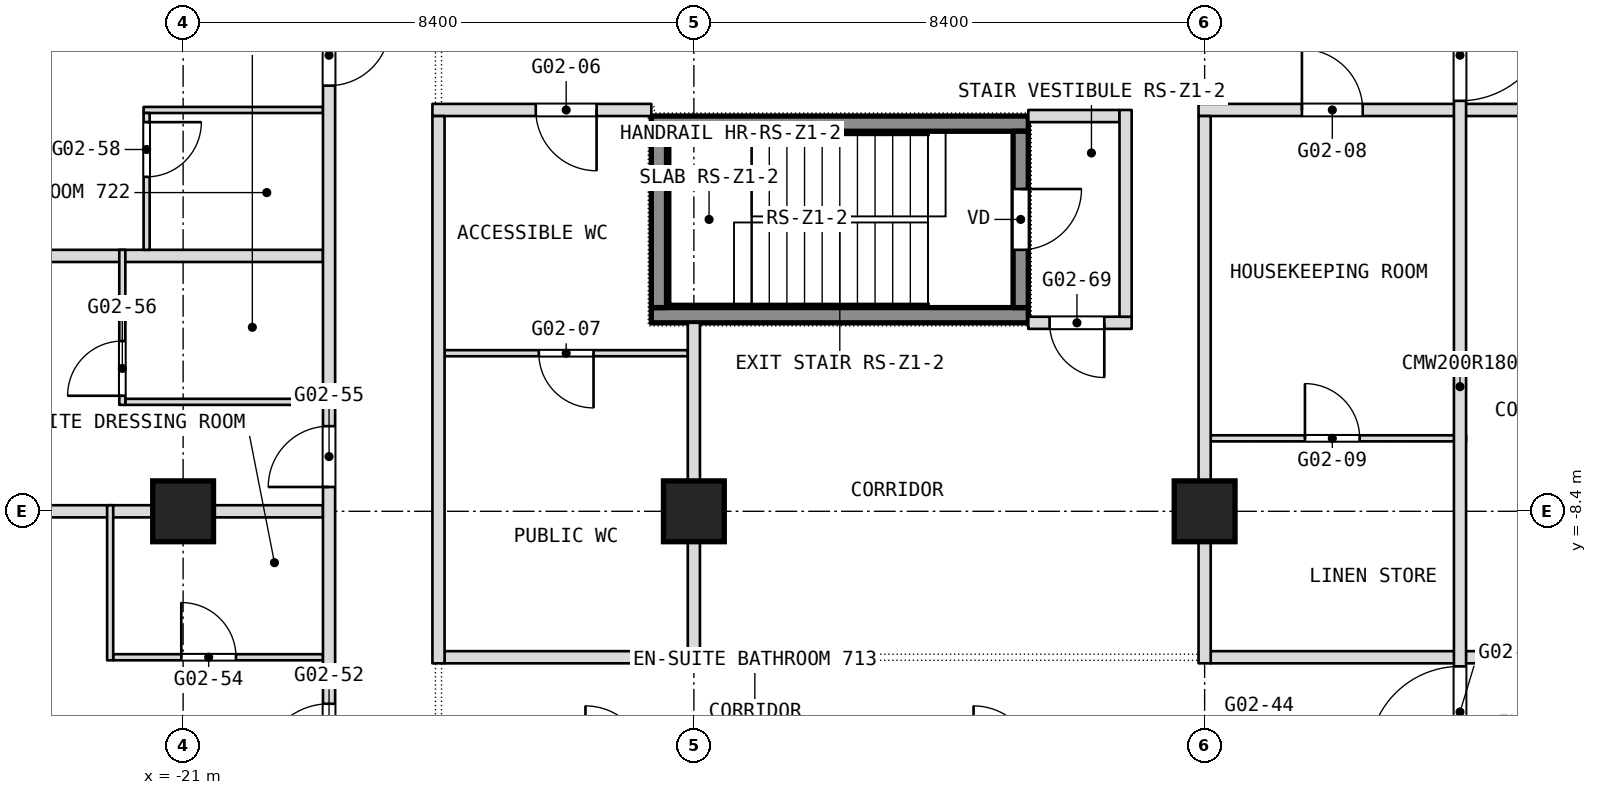
"""IFC4 building model, lengths in metres.
Left out: names, types, materials, properties, quantities, classifications, styles, units other than length and angle.
Written with IfcOpenShell. Run it as: python <this file> out.ifc"""

import sys

from ifc_helpers import new_model, si_unit, direction, frame, frame_2d, origin, origin_2d, place, context, subcontext, project, spatial, rectangle, extrude, element, fill, save


model = new_model("IFC4")
c1 = context("Model", 3, precision=1e-05, world=origin(), true_north=direction((0.0, 1.0)))
c2 = subcontext(c1, "Body", "Model", "MODEL_VIEW")
j1 = project(units=[si_unit("LENGTHUNIT", "METRE"), si_unit("PLANEANGLEUNIT", "RADIAN")], contexts=[c1])
p1 = place(None, origin())
s1 = spatial("IfcSite", under=j1, at=p1, CompositionType="ELEMENT")
p2 = place(p1, origin())
s2 = spatial("IfcBuilding", under=s1, at=p2, CompositionType="ELEMENT")
p3 = place(p2, frame((0.0, 0.0, 40.1)))
s3 = spatial("IfcBuildingStorey", under=s2, at=p3, CompositionType="ELEMENT", Elevation=40.1)
for number, where, z_axis, x_axis in (
    (1, (-21.0, -8.4, 0.0), (0.0, 0.0, 1.0), (1.0, 0.0, 0.0)),
    (2, (-12.6, -8.4, 0.0), (0.0, 0.0, 1.0), (1.0, 0.0, 0.0)),
    (3, (-4.2, -8.4, 0.0), (0.0, 0.0, 1.0), (1.0, 0.0, 0.0)),
):
    element("IfcColumn", number, at=place(p3, frame(where, z_axis=z_axis, x_axis=x_axis)), inside=s3, PredefinedType="COLUMN", context=c2, shape_type="SweptSolid", body=[
        extrude(rectangle(XDim=1.0, YDim=1.0, at=origin_2d()), origin(), (0.0, 0.0, 1.0), 3.6),
    ])
p4 = place(p3, frame((-22.15, -10.8, 0.0), z_axis=(0.0, 0.0, 1.0), x_axis=(1.0, 0.0, 0.0)))
e4 = element("IfcWall", 4, at=p4, inside=s3, PredefinedType="PARTITIONING", context=c2, shape_type="SweptSolid", body=[
    extrude(rectangle(XDim=3.45, YDim=0.1, at=frame_2d((1.725, 0.0))), origin(), (0.0, 0.0, 1.0), 3.34),
])
p5 = place(p4, frame((1.12, 0.0, 0.0)))
e5 = element("IfcOpeningElement", 5, at=p5, cuts=e4, PredefinedType="OPENING", context=c2, shape_type="SweptSolid", body=[
    extrude(rectangle(XDim=0.9, YDim=2.1, at=frame_2d((0.45, 1.05))), frame((0.0, 0.05, 0.0), z_axis=(0.0, -1.0, 0.0), x_axis=(1.0, 0.0, 0.0)), (0.0, 0.0, 1.0), 0.1),
])
p6 = place(p3, frame((-16.7, -10.8, 0.0), z_axis=(0.0, 0.0, 1.0), x_axis=(1.0, 0.0, 0.0)))
e6 = element("IfcWall", 6, at=p6, inside=s3, PredefinedType="PARTITIONING", context=c2, shape_type="SweptSolid", body=[
    extrude(rectangle(XDim=4.0, YDim=0.2, at=frame_2d((2.0, 0.0))), origin(), (0.0, 0.0, 1.0), 3.34),
])
p7 = place(p3, frame((-4.1, -10.8, 0.0), z_axis=(0.0, 0.0, 1.0), x_axis=(1.0, 0.0, 0.0)))
e7 = element("IfcWall", 7, at=p7, inside=s3, PredefinedType="PARTITIONING", context=c2, shape_type="SweptSolid", body=[
    extrude(rectangle(XDim=20.8, YDim=0.2, at=frame_2d((10.4, 0.0))), origin(), (0.0, 0.0, 1.0), 3.34),
])
p8 = place(p3, frame((-29.7, -8.4, 0.0), z_axis=(0.0, 0.0, 1.0), x_axis=(1.0, 0.0, 0.0)))
e8 = element("IfcWall", 8, at=p8, inside=s3, PredefinedType="PARTITIONING", context=c2, shape_type="SweptSolid", body=[
    extrude(rectangle(XDim=11.0, YDim=0.2, at=frame_2d((5.5, 0.0))), origin(), (0.0, 0.0, 1.0), 2.84),
])
p9 = place(p3, frame((-4.1, -7.2, 0.0), z_axis=(0.0, 0.0, 1.0), x_axis=(1.0, 0.0, 0.0)))
e9 = element("IfcWall", 9, at=p9, inside=s3, PredefinedType="PARTITIONING", context=c2, shape_type="SweptSolid", body=[
    extrude(rectangle(XDim=4.2, YDim=0.1, at=frame_2d((2.1, 0.0))), origin(), (0.0, 0.0, 1.0), 3.34),
])
p10 = place(p9, frame((1.55, 0.0, 0.0)))
e10 = element("IfcOpeningElement", 10, at=p10, cuts=e9, PredefinedType="OPENING", context=c2, shape_type="SweptSolid", body=[
    extrude(rectangle(XDim=0.9, YDim=2.1, at=frame_2d((0.45, 1.05))), frame((0.0, 0.05, 0.0), z_axis=(0.0, -1.0, 0.0), x_axis=(1.0, 0.0, 0.0)), (0.0, 0.0, 1.0), 0.1),
])
p11 = place(p3, frame((-21.95, -6.6, 0.0), z_axis=(0.0, 0.0, 1.0), x_axis=(1.0, 0.0, 0.0)))
e11 = element("IfcWall", 11, at=p11, inside=s3, PredefinedType="PARTITIONING", context=c2, shape_type="SweptSolid", body=[
    extrude(rectangle(XDim=3.25, YDim=0.1, at=frame_2d((1.625, 0.0))), origin(), (0.0, 0.0, 1.0), 3.34),
])
p12 = place(p3, frame((-16.7, -5.8, 0.0), z_axis=(0.0, 0.0, 1.0), x_axis=(1.0, 0.0, 0.0)))
e12 = element("IfcWall", 12, at=p12, inside=s3, PredefinedType="PARTITIONING", context=c2, shape_type="SweptSolid", body=[
    extrude(rectangle(XDim=4.0, YDim=0.1, at=frame_2d((2.0, 0.0))), origin(), (0.0, 0.0, 1.0), 3.34),
])
p13 = place(p12, frame((1.55, 0.0, 0.0)))
e13 = element("IfcOpeningElement", 13, at=p13, cuts=e12, PredefinedType="OPENING", context=c2, shape_type="SweptSolid", body=[
    extrude(rectangle(XDim=0.9, YDim=2.1, at=frame_2d((0.45, 1.05))), frame((0.0, 0.05, 0.0), z_axis=(0.0, -1.0, 0.0), x_axis=(1.0, 0.0, 0.0)), (0.0, 0.0, 1.0), 0.1),
])
p14 = place(p3, frame((-7.1, -5.3, 0.0), z_axis=(0.0, 0.0, 1.0), x_axis=(1.0, 0.0, 0.0)))
e14 = element("IfcWall", 14, at=p14, inside=s3, PredefinedType="PARTITIONING", context=c2, shape_type="SweptSolid", body=[
    extrude(rectangle(XDim=1.7, YDim=0.2, at=frame_2d((0.85, 0.0))), origin(), (0.0, 0.0, 1.0), 3.34),
])
p15 = place(p14, frame((0.35, 0.0, 0.0)))
e15 = element("IfcOpeningElement", 15, at=p15, cuts=e14, PredefinedType="OPENING", context=c2, shape_type="SweptSolid", body=[
    extrude(rectangle(XDim=0.9, YDim=2.1, at=frame_2d((0.45, 1.05))), frame((0.0, 0.1, 0.0), z_axis=(0.0, -1.0, 0.0), x_axis=(1.0, 0.0, 0.0)), (0.0, 0.0, 1.0), 0.2),
])
p16 = place(p3, frame((-29.7, -4.2, 0.0), z_axis=(0.0, 0.0, 1.0), x_axis=(1.0, 0.0, 0.0)))
e16 = element("IfcWall", 16, at=p16, inside=s3, PredefinedType="PARTITIONING", context=c2, shape_type="SweptSolid", body=[
    extrude(rectangle(XDim=11.0, YDim=0.2, at=frame_2d((5.5, 0.0))), origin(), (0.0, 0.0, 1.0), 3.34),
])
p17 = place(p3, frame((-7.1, -1.9, 0.0), z_axis=(0.0, 0.0, 1.0), x_axis=(1.0, 0.0, 0.0)))
e17 = element("IfcWall", 17, at=p17, inside=s3, PredefinedType="PARTITIONING", context=c2, shape_type="SweptSolid", body=[
    extrude(rectangle(XDim=1.5, YDim=0.2, at=frame_2d((0.75, 0.0))), origin(), (0.0, 0.0, 1.0), 3.34),
])
p18 = place(p3, frame((-21.65, -1.8, 0.0), z_axis=(0.0, 0.0, 1.0), x_axis=(1.0, 0.0, 0.0)))
e18 = element("IfcWall", 18, at=p18, inside=s3, PredefinedType="PARTITIONING", context=c2, shape_type="SweptSolid", body=[
    extrude(rectangle(XDim=2.95, YDim=0.1, at=frame_2d((1.475, 0.0))), origin(), (0.0, 0.0, 1.0), 3.34),
])
p19 = place(p3, frame((-16.9, -1.8, 0.0), z_axis=(0.0, 0.0, 1.0), x_axis=(1.0, 0.0, 0.0)))
e19 = element("IfcWall", 19, at=p19, inside=s3, PredefinedType="PARTITIONING", context=c2, shape_type="SweptSolid", body=[
    extrude(rectangle(XDim=3.6, YDim=0.2, at=frame_2d((1.8, 0.0))), origin(), (0.0, 0.0, 1.0), 3.34),
])
p20 = place(p19, frame((1.7, 0.0, 0.0)))
e20 = element("IfcOpeningElement", 20, at=p20, cuts=e19, PredefinedType="OPENING", context=c2, shape_type="SweptSolid", body=[
    extrude(rectangle(XDim=1.0, YDim=2.1, at=frame_2d((0.5, 1.05))), frame((0.0, 0.1, 0.0), z_axis=(0.0, -1.0, 0.0), x_axis=(1.0, 0.0, 0.0)), (0.0, 0.0, 1.0), 0.2),
])
p21 = place(p3, frame((-4.3, -1.8, 0.0), z_axis=(0.0, 0.0, 1.0), x_axis=(1.0, 0.0, 0.0)))
e21 = element("IfcWall", 21, at=p21, inside=s3, PredefinedType="PARTITIONING", context=c2, shape_type="SweptSolid", body=[
    extrude(rectangle(XDim=10.9, YDim=0.2, at=frame_2d((5.45, 0.0))), origin(), (0.0, 0.0, 1.0), 3.34),
])
p22 = place(p21, frame((1.7, 0.0, 0.0)))
e22 = element("IfcOpeningElement", 22, at=p22, cuts=e21, PredefinedType="OPENING", context=c2, shape_type="SweptSolid", body=[
    extrude(rectangle(XDim=1.0, YDim=2.1, at=frame_2d((0.5, 1.05))), frame((0.0, 0.1, 0.0), z_axis=(0.0, -1.0, 0.0), x_axis=(1.0, 0.0, 0.0)), (0.0, 0.0, 1.0), 0.2),
])
p23 = place(p21, frame((5.9, 0.0, 0.0)))
e23 = element("IfcOpeningElement", 23, at=p23, cuts=e21, PredefinedType="OPENING", context=c2, shape_type="SweptSolid", body=[
    extrude(rectangle(XDim=1.0, YDim=2.1, at=frame_2d((0.5, 1.05))), frame((0.0, 0.1, 0.0), z_axis=(0.0, -1.0, 0.0), x_axis=(1.0, 0.0, 0.0)), (0.0, 0.0, 1.0), 0.2),
])
p24 = place(p21, frame((9.65, 0.0, 0.0)))
e24 = element("IfcOpeningElement", 24, at=p24, cuts=e21, PredefinedType="OPENING", context=c2, shape_type="SweptSolid", body=[
    extrude(rectangle(XDim=1.0, YDim=2.1, at=frame_2d((0.5, 1.05))), frame((0.0, 0.1, 0.0), z_axis=(0.0, -1.0, 0.0), x_axis=(1.0, 0.0, 0.0)), (0.0, 0.0, 1.0), 0.2),
])
p25 = place(p3, frame((0.0, -12.7, 0.0), z_axis=(0.0, 0.0, 1.0), x_axis=(0.0, 1.0, 0.0)))
e25 = element("IfcWall", 25, at=p25, inside=s3, PredefinedType="PARTITIONING", context=c2, shape_type="SweptSolid", body=[
    extrude(rectangle(XDim=12.7, YDim=0.2, at=frame_2d((6.35, 0.0))), origin(), (0.0, 0.0, 1.0), 3.34),
])
p26 = place(p25, frame((11.05, 0.0, 0.0)))
e26 = element("IfcOpeningElement", 26, at=p26, cuts=e25, PredefinedType="OPENING", context=c2, shape_type="SweptSolid", body=[
    extrude(rectangle(XDim=1.5, YDim=2.1, at=frame_2d((0.75, 1.05))), frame((0.0, 0.1, 0.0), z_axis=(0.0, -1.0, 0.0), x_axis=(1.0, 0.0, 0.0)), (0.0, 0.0, 1.0), 0.2),
])
p27 = place(p25, frame((0.25, 0.0, 0.0)))
e27 = element("IfcOpeningElement", 27, at=p27, cuts=e25, PredefinedType="OPENING", context=c2, shape_type="SweptSolid", body=[
    extrude(rectangle(XDim=1.5, YDim=2.1, at=frame_2d((0.75, 1.05))), frame((0.0, 0.1, 0.0), z_axis=(0.0, -1.0, 0.0), x_axis=(1.0, 0.0, 0.0)), (0.0, 0.0, 1.0), 0.2),
])
p28 = place(p3, frame((-4.2, -10.9, 0.0), z_axis=(0.0, 0.0, 1.0), x_axis=(0.0, 1.0, 0.0)))
e28 = element("IfcWall", 28, at=p28, inside=s3, PredefinedType="PARTITIONING", context=c2, shape_type="SweptSolid", body=[
    extrude(rectangle(XDim=9.0, YDim=0.2, at=frame_2d((4.5, 0.0))), origin(), (0.0, 0.0, 1.0), 3.34),
])
p29 = place(p3, frame((-5.5, -5.2, 0.0), z_axis=(0.0, 0.0, 1.0), x_axis=(0.0, 1.0, 0.0)))
e29 = element("IfcWall", 29, at=p29, inside=s3, PredefinedType="PARTITIONING", context=c2, shape_type="SweptSolid", body=[
    extrude(rectangle(XDim=3.4, YDim=0.2, at=frame_2d((1.7, 0.0))), origin(), (0.0, 0.0, 1.0), 3.34),
])
p30 = place(p3, frame((-12.6, -10.9, 0.0), z_axis=(0.0, 0.0, 1.0), x_axis=(0.0, 1.0, 0.0)))
e30 = element("IfcWall", 30, at=p30, inside=s3, PredefinedType="PARTITIONING", context=c2, shape_type="SweptSolid", body=[
    extrude(rectangle(XDim=5.6, YDim=0.2, at=frame_2d((2.8, 0.0))), origin(), (0.0, 0.0, 1.0), 3.34),
])
p31 = place(p3, frame((-16.8, -10.9, 0.0), z_axis=(0.0, 0.0, 1.0), x_axis=(0.0, 1.0, 0.0)))
e31 = element("IfcWall", 31, at=p31, inside=s3, PredefinedType="PARTITIONING", context=c2, shape_type="SweptSolid", body=[
    extrude(rectangle(XDim=9.0, YDim=0.2, at=frame_2d((4.5, 0.0))), origin(), (0.0, 0.0, 1.0), 3.34),
])
p32 = place(p3, frame((-18.6, -16.665, 0.0), z_axis=(0.0, 0.0, 1.0), x_axis=(0.0, 1.0, 0.0)))
e32 = element("IfcWall", 32, at=p32, inside=s3, PredefinedType="PARTITIONING", context=c2, shape_type="SweptSolid", body=[
    extrude(rectangle(XDim=23.565, YDim=0.2, at=frame_2d((11.782, 0.0))), origin(), (0.0, 0.0, 1.0), 3.34),
])
p33 = place(p32, frame((4.0, 0.0, 0.0)))
e33 = element("IfcOpeningElement", 33, at=p33, cuts=e32, PredefinedType="OPENING", context=c2, shape_type="SweptSolid", body=[
    extrude(rectangle(XDim=1.1, YDim=2.1, at=frame_2d((0.55, 1.05))), frame((0.0, 0.1, 0.0), z_axis=(0.0, -1.0, 0.0), x_axis=(1.0, 0.0, 0.0)), (0.0, 0.0, 1.0), 0.2),
])
p34 = place(p32, frame((8.665, 0.0, 0.0)))
e34 = element("IfcOpeningElement", 34, at=p34, cuts=e32, PredefinedType="OPENING", context=c2, shape_type="SweptSolid", body=[
    extrude(rectangle(XDim=1.0, YDim=2.1, at=frame_2d((0.5, 1.05))), frame((0.0, 0.1, 0.0), z_axis=(0.0, -1.0, 0.0), x_axis=(1.0, 0.0, 0.0)), (0.0, 0.0, 1.0), 0.2),
])
p35 = place(p32, frame((15.265, 0.0, 0.0)))
e35 = element("IfcOpeningElement", 35, at=p35, cuts=e32, PredefinedType="OPENING", context=c2, shape_type="SweptSolid", body=[
    extrude(rectangle(XDim=1.0, YDim=2.1, at=frame_2d((0.5, 1.05))), frame((0.0, 0.1, 0.0), z_axis=(0.0, -1.0, 0.0), x_axis=(1.0, 0.0, 0.0)), (0.0, 0.0, 1.0), 0.2),
])
p36 = place(p32, frame((19.465, 0.0, 0.0)))
e36 = element("IfcOpeningElement", 36, at=p36, cuts=e32, PredefinedType="OPENING", context=c2, shape_type="SweptSolid", body=[
    extrude(rectangle(XDim=1.0, YDim=2.1, at=frame_2d((0.5, 1.05))), frame((0.0, 0.1, 0.0), z_axis=(0.0, -1.0, 0.0), x_axis=(1.0, 0.0, 0.0)), (0.0, 0.0, 1.0), 0.2),
])
p37 = place(p3, frame((-21.6, -4.1, 0.0), z_axis=(0.0, 0.0, 1.0), x_axis=(0.0, 1.0, 0.0)))
e37 = element("IfcWall", 37, at=p37, inside=s3, PredefinedType="PARTITIONING", context=c2, shape_type="SweptSolid", body=[
    extrude(rectangle(XDim=2.25, YDim=0.1, at=frame_2d((1.125, 0.0))), origin(), (0.0, 0.0, 1.0), 3.34),
])
p38 = place(p37, frame((1.2, 0.0, 0.0)))
e38 = element("IfcOpeningElement", 38, at=p38, cuts=e37, PredefinedType="OPENING", context=c2, shape_type="SweptSolid", body=[
    extrude(rectangle(XDim=0.9, YDim=2.1, at=frame_2d((0.45, 1.05))), frame((0.0, 0.05, 0.0), z_axis=(0.0, -1.0, 0.0), x_axis=(1.0, 0.0, 0.0)), (0.0, 0.0, 1.0), 0.1),
])
p39 = place(p3, frame((-22.0, -6.65, 0.0), z_axis=(0.0, 0.0, 1.0), x_axis=(0.0, 1.0, 0.0)))
e39 = element("IfcWall", 39, at=p39, inside=s3, PredefinedType="PARTITIONING", context=c2, shape_type="SweptSolid", body=[
    extrude(rectangle(XDim=2.55, YDim=0.1, at=frame_2d((1.275, 0.0))), origin(), (0.0, 0.0, 1.0), 3.34),
])
p40 = place(p39, frame((0.15, 0.0, 0.0)))
e40 = element("IfcOpeningElement", 40, at=p40, cuts=e39, PredefinedType="OPENING", context=c2, shape_type="SweptSolid", body=[
    extrude(rectangle(XDim=0.9, YDim=2.1, at=frame_2d((0.45, 1.05))), frame((0.0, 0.05, 0.0), z_axis=(0.0, -1.0, 0.0), x_axis=(1.0, 0.0, 0.0)), (0.0, 0.0, 1.0), 0.1),
])
p41 = place(p3, frame((-22.2, -10.85, 0.0), z_axis=(0.0, 0.0, 1.0), x_axis=(0.0, 1.0, 0.0)))
e41 = element("IfcWall", 41, at=p41, inside=s3, PredefinedType="PARTITIONING", context=c2, shape_type="SweptSolid", body=[
    extrude(rectangle(XDim=2.55, YDim=0.1, at=frame_2d((1.275, 0.0))), origin(), (0.0, 0.0, 1.0), 3.34),
])
for number, where, z_axis, x_axis in (
    (42, (-13.3, -5.175, 0.1), (0.0, 0.0, 1.0), (1.0, 0.0, 0.0)),
    (43, (-13.3, -2.025, 0.1), (0.0, 0.0, 1.0), (1.0, 0.0, 0.0)),
):
    element("IfcWall", number, at=place(p3, frame(where, z_axis=z_axis, x_axis=x_axis)), inside=s3, PredefinedType="SHEAR", context=c2, shape_type="SweptSolid", body=[
        extrude(rectangle(XDim=6.2, YDim=0.25, at=frame_2d((3.1, 0.0))), origin(), (0.0, 0.0, 1.0), 3.6),
    ])
p42 = place(p3, frame((-13.175, -5.05, 0.1), z_axis=(0.0, 0.0, 1.0), x_axis=(0.0, 1.0, 0.0)))
e44 = element("IfcWall", 44, at=p42, inside=s3, PredefinedType="SHEAR", context=c2, shape_type="SweptSolid", body=[
    extrude(rectangle(XDim=2.9, YDim=0.25, at=frame_2d((1.45, 0.0))), origin(), (0.0, 0.0, 1.0), 3.6),
])
p43 = place(p3, frame((-7.225, -5.05, 0.1), z_axis=(0.0, 0.0, 1.0), x_axis=(0.0, 1.0, 0.0)))
e45 = element("IfcWall", 45, at=p43, inside=s3, PredefinedType="SHEAR", context=c2, shape_type="SweptSolid", body=[
    extrude(rectangle(XDim=2.9, YDim=0.25, at=frame_2d((1.45, 0.0))), origin(), (0.0, 0.0, 1.0), 3.6),
])
p44 = place(p43, frame((0.95, 0.0, 0.0)))
e46 = element("IfcOpeningElement", 46, at=p44, cuts=e45, PredefinedType="OPENING", context=c2, shape_type="SweptSolid", body=[
    extrude(rectangle(XDim=1.0, YDim=2.1, at=frame_2d((0.5, 1.05))), frame((0.0, 0.125, 0.0), z_axis=(0.0, -1.0, 0.0), x_axis=(1.0, 0.0, 0.0)), (0.0, 0.0, 1.0), 0.25),
])
p45 = place(p5, origin())
e47 = element("IfcDoor", 47, at=p45, inside=s3, OperationType="SINGLE_SWING_LEFT", PredefinedType="DOOR", context=c2, shape_type="SweptSolid", body=[
    extrude(rectangle(XDim=0.9, YDim=2.1, at=frame_2d((0.45, 1.05))), frame((0.0, 0.025, 0.0), z_axis=(0.0, -1.0, 0.0), x_axis=(1.0, 0.0, 0.0)), (0.0, 0.0, 1.0), 0.05),
])
fill(e5, e47)
p46 = place(p10, origin())
e48 = element("IfcDoor", 48, at=p46, inside=s3, OperationType="SINGLE_SWING_RIGHT", PredefinedType="DOOR", context=c2, shape_type="SweptSolid", body=[
    extrude(rectangle(XDim=0.9, YDim=2.1, at=frame_2d((0.45, 1.05))), frame((0.0, 0.025, 0.0), z_axis=(0.0, -1.0, 0.0), x_axis=(1.0, 0.0, 0.0)), (0.0, 0.0, 1.0), 0.05),
])
fill(e10, e48)
p47 = place(p13, origin())
e49 = element("IfcDoor", 49, at=p47, inside=s3, OperationType="SINGLE_SWING_LEFT", PredefinedType="DOOR", context=c2, shape_type="SweptSolid", body=[
    extrude(rectangle(XDim=0.9, YDim=2.1, at=frame_2d((0.45, 1.05))), frame((0.0, 0.025, 0.0), z_axis=(0.0, -1.0, 0.0), x_axis=(1.0, 0.0, 0.0)), (0.0, 0.0, 1.0), 0.05),
])
fill(e13, e49)
p48 = place(p15, origin())
e50 = element("IfcDoor", 50, at=p48, inside=s3, OperationType="SINGLE_SWING_RIGHT", PredefinedType="DOOR", context=c2, shape_type="SweptSolid", body=[
    extrude(rectangle(XDim=0.9, YDim=2.1, at=frame_2d((0.45, 1.05))), frame((0.0, 0.025, 0.0), z_axis=(0.0, -1.0, 0.0), x_axis=(1.0, 0.0, 0.0)), (0.0, 0.0, 1.0), 0.05),
])
fill(e15, e50)
p49 = place(p20, origin())
e51 = element("IfcDoor", 51, at=p49, inside=s3, OperationType="SINGLE_SWING_RIGHT", PredefinedType="DOOR", context=c2, shape_type="SweptSolid", body=[
    extrude(rectangle(XDim=1.0, YDim=2.1, at=frame_2d((0.5, 1.05))), frame((0.0, 0.025, 0.0), z_axis=(0.0, -1.0, 0.0), x_axis=(1.0, 0.0, 0.0)), (0.0, 0.0, 1.0), 0.05),
])
fill(e20, e51)
p50 = place(p22, origin())
e52 = element("IfcDoor", 52, at=p50, inside=s3, OperationType="SINGLE_SWING_RIGHT", PredefinedType="DOOR", context=c2, shape_type="SweptSolid", body=[
    extrude(rectangle(XDim=1.0, YDim=2.1, at=frame_2d((0.5, 1.05))), frame((0.0, 0.025, 0.0), z_axis=(0.0, -1.0, 0.0), x_axis=(1.0, 0.0, 0.0)), (0.0, 0.0, 1.0), 0.05),
])
fill(e22, e52)
p51 = place(p33, origin())
e53 = element("IfcDoor", 53, at=p51, inside=s3, OperationType="SINGLE_SWING_LEFT", PredefinedType="DOOR", context=c2, shape_type="SweptSolid", body=[
    extrude(rectangle(XDim=1.1, YDim=2.1, at=frame_2d((0.55, 1.05))), frame((0.0, 0.025, 0.0), z_axis=(0.0, -1.0, 0.0), x_axis=(1.0, 0.0, 0.0)), (0.0, 0.0, 1.0), 0.05),
])
fill(e33, e53)
p52 = place(p34, origin())
e54 = element("IfcDoor", 54, at=p52, inside=s3, OperationType="SINGLE_SWING_RIGHT", PredefinedType="DOOR", context=c2, shape_type="SweptSolid", body=[
    extrude(rectangle(XDim=1.0, YDim=2.1, at=frame_2d((0.5, 1.05))), frame((0.0, 0.025, 0.0), z_axis=(0.0, -1.0, 0.0), x_axis=(1.0, 0.0, 0.0)), (0.0, 0.0, 1.0), 0.05),
])
fill(e34, e54)
p53 = place(p35, origin())
e55 = element("IfcDoor", 55, at=p53, inside=s3, OperationType="SINGLE_SWING_RIGHT", PredefinedType="DOOR", context=c2, shape_type="SweptSolid", body=[
    extrude(rectangle(XDim=1.0, YDim=2.1, at=frame_2d((0.5, 1.05))), frame((0.0, 0.025, 0.0), z_axis=(0.0, -1.0, 0.0), x_axis=(1.0, 0.0, 0.0)), (0.0, 0.0, 1.0), 0.05),
])
fill(e35, e55)
p54 = place(p38, origin())
e56 = element("IfcDoor", 56, at=p54, inside=s3, OperationType="SINGLE_SWING_LEFT", PredefinedType="DOOR", context=c2, shape_type="SweptSolid", body=[
    extrude(rectangle(XDim=0.9, YDim=2.1, at=frame_2d((0.45, 1.05))), frame((0.0, 0.025, 0.0), z_axis=(0.0, -1.0, 0.0), x_axis=(1.0, 0.0, 0.0)), (0.0, 0.0, 1.0), 0.05),
])
fill(e38, e56)
p55 = place(p40, origin())
e57 = element("IfcDoor", 57, at=p55, inside=s3, OperationType="SINGLE_SWING_RIGHT", PredefinedType="DOOR", context=c2, shape_type="SweptSolid", body=[
    extrude(rectangle(XDim=0.9, YDim=2.1, at=frame_2d((0.45, 1.05))), frame((0.0, 0.025, 0.0), z_axis=(0.0, -1.0, 0.0), x_axis=(1.0, 0.0, 0.0)), (0.0, 0.0, 1.0), 0.05),
])
fill(e40, e57)
p56 = place(p44, origin())
e58 = element("IfcDoor", 58, at=p56, inside=s3, OperationType="SINGLE_SWING_LEFT", PredefinedType="DOOR", context=c2, shape_type="SweptSolid", body=[
    extrude(rectangle(XDim=1.0, YDim=2.1, at=frame_2d((0.5, 1.05))), frame((0.0, 0.025, 0.0), z_axis=(0.0, -1.0, 0.0), x_axis=(1.0, 0.0, 0.0)), (0.0, 0.0, 1.0), 0.05),
])
fill(e46, e58)
p57 = place(p26, origin())
e59 = element("IfcDoor", 59, at=p57, inside=s3, OperationType="DOUBLE_DOOR_DOUBLE_SWING", PredefinedType="DOOR", context=c2, shape_type="SweptSolid", body=[
    extrude(rectangle(XDim=1.5, YDim=2.1, at=frame_2d((0.75, 1.05))), frame((0.0, 0.025, 0.0), z_axis=(0.0, -1.0, 0.0), x_axis=(1.0, 0.0, 0.0)), (0.0, 0.0, 1.0), 0.05),
])
fill(e26, e59)
p58 = place(p27, origin())
e60 = element("IfcDoor", 60, at=p58, inside=s3, OperationType="DOUBLE_DOOR_DOUBLE_SWING", PredefinedType="DOOR", context=c2, shape_type="SweptSolid", body=[
    extrude(rectangle(XDim=1.5, YDim=2.1, at=frame_2d((0.75, 1.05))), frame((0.0, 0.025, 0.0), z_axis=(0.0, -1.0, 0.0), x_axis=(1.0, 0.0, 0.0)), (0.0, 0.0, 1.0), 0.05),
])
fill(e27, e60)
save(model, sys.argv[1])
